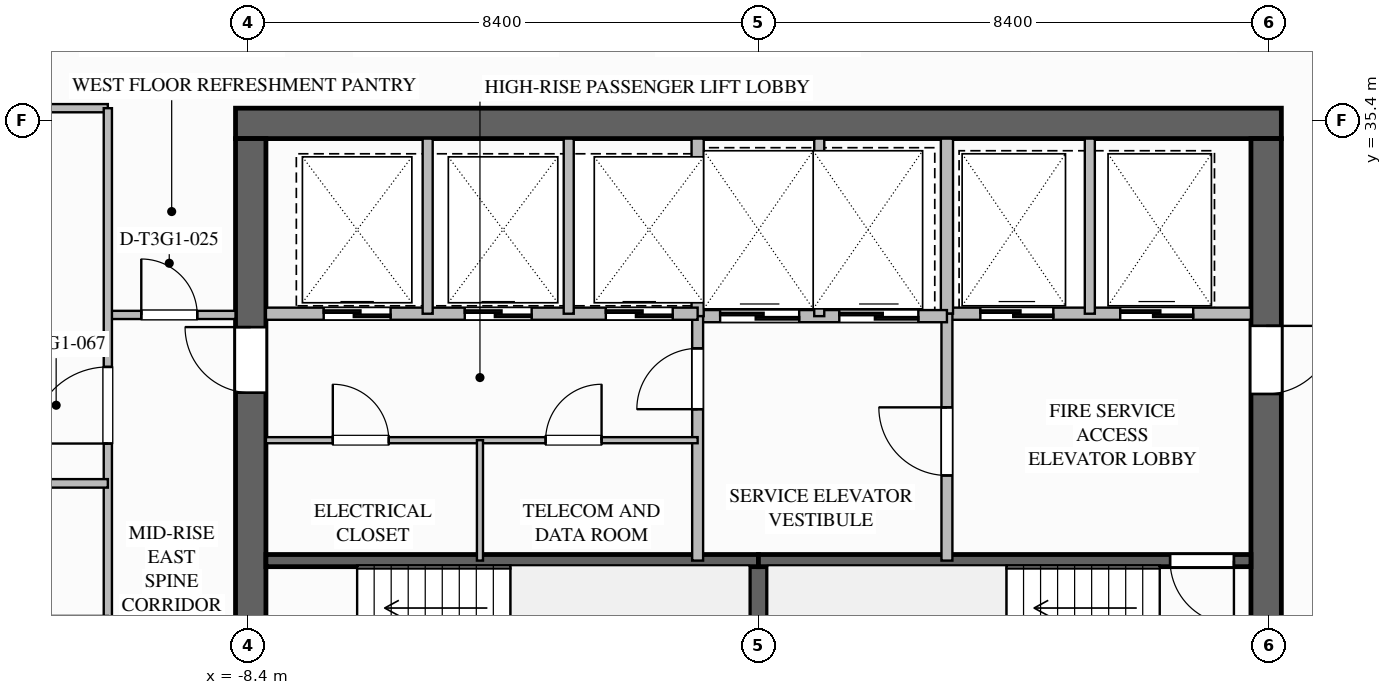
"""IFC4 building model, lengths in metres.
Left out: names, types, materials, properties, quantities, classifications, styles, units other than length and angle.
Written with IfcOpenShell. Run it as: python <this file> out.ifc"""

import sys

from ifc_helpers import new_model, si_unit, direction, frame, frame_2d, origin, place, context, subcontext, project, spatial, rectangle, extrude, element, fill, save


model = new_model("IFC4")
c1 = context("Model", 3, precision=1e-05, world=origin(), true_north=direction((0.0, 1.0)))
c2 = subcontext(c1, "Body", "Model", "MODEL_VIEW")
j1 = project(units=[si_unit("LENGTHUNIT", "METRE"), si_unit("PLANEANGLEUNIT", "RADIAN")], contexts=[c1])
p1 = place(None, origin())
s1 = spatial("IfcSite", under=j1, at=p1, CompositionType="ELEMENT")
p2 = place(p1, origin())
s2 = spatial("IfcBuilding", under=s1, at=p2, CompositionType="ELEMENT")
p3 = place(p2, frame((0.0, 0.0, 150.4)))
s3 = spatial("IfcBuildingStorey", under=s2, at=p3, CompositionType="ELEMENT", Elevation=150.4)
p4 = place(p3, frame((-8.6, 35.35, 0.0), z_axis=(0.0, 0.0, 1.0), x_axis=(1.0, 0.0, 0.0)))
e1 = element("IfcWall", 1, at=p4, inside=s3, PredefinedType="SHEAR", context=c2, shape_type="SweptSolid", body=[
    extrude(rectangle(XDim=17.2, YDim=0.5, at=frame_2d((8.6, 0.0))), origin(), (0.0, 0.0, 1.0), 3.55),
])
p5 = place(p3, frame((8.35, 35.1, 0.0), z_axis=(0.0, 0.0, 1.0), x_axis=(0.0, -1.0, 0.0)))
e2 = element("IfcWall", 2, at=p5, inside=s3, PredefinedType="SHEAR", context=c2, shape_type="SweptSolid", body=[
    extrude(rectangle(XDim=16.2, YDim=0.5, at=frame_2d((8.1, 0.0))), origin(), (0.0, 0.0, 1.0), 3.55),
])
p6 = place(p5, frame((3.08, 0.0, 0.0)))
e3 = element("IfcOpeningElement", 3, at=p6, cuts=e2, PredefinedType="OPENING", context=c2, shape_type="SweptSolid", body=[
    extrude(rectangle(XDim=1.12, YDim=2.1, at=frame_2d((0.56, 1.05))), frame((0.0, 0.26, 0.0), z_axis=(0.0, -1.0, 0.0), x_axis=(1.0, 0.0, 0.0)), (0.0, 0.0, 1.0), 0.52),
])
p7 = place(p5, frame((10.62, 0.0, 0.0)))
e4 = element("IfcOpeningElement", 4, at=p7, cuts=e2, PredefinedType="OPENING", context=c2, shape_type="SweptSolid", body=[
    extrude(rectangle(XDim=1.08, YDim=2.04, at=frame_2d((0.54, 1.02))), frame((0.0, 0.26, 0.0), z_axis=(0.0, -1.0, 0.0), x_axis=(1.0, 0.0, 0.0)), (0.0, 0.0, 1.0), 0.52),
])
p8 = place(p3, frame((-8.35, 18.9, 0.0), z_axis=(0.0, 0.0, 1.0), x_axis=(0.0, 1.0, 0.0)))
e5 = element("IfcWall", 5, at=p8, inside=s3, PredefinedType="SHEAR", context=c2, shape_type="SweptSolid", body=[
    extrude(rectangle(XDim=16.2, YDim=0.5, at=frame_2d((8.1, 0.0))), origin(), (0.0, 0.0, 1.0), 3.55),
])
p9 = place(p8, frame((12.02, 0.0, 0.0)))
e6 = element("IfcOpeningElement", 6, at=p9, cuts=e5, PredefinedType="OPENING", context=c2, shape_type="SweptSolid", body=[
    extrude(rectangle(XDim=1.08, YDim=2.04, at=frame_2d((0.54, 1.02))), frame((0.0, 0.26, 0.0), z_axis=(0.0, -1.0, 0.0), x_axis=(1.0, 0.0, 0.0)), (0.0, 0.0, 1.0), 0.52),
])
p10 = place(p8, frame((4.5, 0.0, 0.0)))
e7 = element("IfcOpeningElement", 7, at=p10, cuts=e5, PredefinedType="OPENING", context=c2, shape_type="SweptSolid", body=[
    extrude(rectangle(XDim=1.08, YDim=2.04, at=frame_2d((0.54, 1.02))), frame((0.0, 0.26, 0.0), z_axis=(0.0, -1.0, 0.0), x_axis=(1.0, 0.0, 0.0)), (0.0, 0.0, 1.0), 0.52),
])
p11 = place(p3, frame((0.0, 25.04, 0.0), z_axis=(0.0, 0.0, 1.0), x_axis=(0.0, 1.0, 0.0)))
e8 = element("IfcWall", 8, at=p11, inside=s3, PredefinedType="SOLIDWALL", context=c2, shape_type="SweptSolid", body=[
    extrude(rectangle(XDim=3.12, YDim=0.3, at=frame_2d((1.56, 0.0))), origin(), (0.0, 0.0, 1.0), 3.29),
])
p12 = place(p3, frame((-8.1, 28.16, 0.0), z_axis=(0.0, 0.0, 1.0), x_axis=(1.0, 0.0, 0.0)))
e9 = element("IfcWall", 9, at=p12, inside=s3, PredefinedType="SOLIDWALL", context=c2, shape_type="SweptSolid", body=[
    extrude(rectangle(XDim=8.1, YDim=0.2, at=frame_2d((4.05, 0.0))), origin(), (0.0, 0.0, 1.0), 3.29),
])
p13 = place(p3, frame((8.1, 28.16, 0.0), z_axis=(0.0, 0.0, 1.0), x_axis=(-1.0, 0.0, 0.0)))
e10 = element("IfcWall", 10, at=p13, inside=s3, PredefinedType="SOLIDWALL", context=c2, shape_type="SweptSolid", body=[
    extrude(rectangle(XDim=8.1, YDim=0.2, at=frame_2d((4.05, 0.0))), origin(), (0.0, 0.0, 1.0), 3.29),
])
p14 = place(p13, frame((0.28, 0.0, 0.0)))
e11 = element("IfcOpeningElement", 11, at=p14, cuts=e10, PredefinedType="OPENING", context=c2, shape_type="SweptSolid", body=[
    extrude(rectangle(XDim=1.05, YDim=2.1, at=frame_2d((0.525, 1.05))), frame((0.0, 0.11, 0.0), z_axis=(0.0, -1.0, 0.0), x_axis=(1.0, 0.0, 0.0)), (0.0, 0.0, 1.0), 0.22),
])
p15 = place(p3, frame((3.1, 32.22, 0.0), z_axis=(0.0, 0.0, 1.0), x_axis=(1.0, 0.0, 0.0)))
e12 = element("IfcWall", 12, at=p15, inside=s3, PredefinedType="SOLIDWALL", context=c2, shape_type="SweptSolid", body=[
    extrude(rectangle(XDim=5.0, YDim=0.2, at=frame_2d((2.5, 0.0))), origin(), (0.0, 0.0, 1.0), 3.29),
])
p16 = place(p15, frame((0.55, 0.0, 0.0)))
e13 = element("IfcOpeningElement", 13, at=p16, cuts=e12, PredefinedType="OPENING", context=c2, shape_type="SweptSolid", body=[
    extrude(rectangle(XDim=1.2, YDim=2.2, at=frame_2d((0.6, 1.1))), frame((0.0, 0.11, 0.0), z_axis=(0.0, -1.0, 0.0), x_axis=(1.0, 0.0, 0.0)), (0.0, 0.0, 1.0), 0.22),
])
p17 = place(p15, frame((2.85, 0.0, 0.0)))
e14 = element("IfcOpeningElement", 14, at=p17, cuts=e12, PredefinedType="OPENING", context=c2, shape_type="SweptSolid", body=[
    extrude(rectangle(XDim=1.2, YDim=2.2, at=frame_2d((0.6, 1.1))), frame((0.0, 0.11, 0.0), z_axis=(0.0, -1.0, 0.0), x_axis=(1.0, 0.0, 0.0)), (0.0, 0.0, 1.0), 0.22),
])
p18 = place(p3, frame((3.1, 32.22, 0.0), z_axis=(0.0, 0.0, 1.0), x_axis=(0.0, 1.0, 0.0)))
e15 = element("IfcWall", 15, at=p18, inside=s3, PredefinedType="SOLIDWALL", context=c2, shape_type="SweptSolid", body=[
    extrude(rectangle(XDim=2.88, YDim=0.2, at=frame_2d((1.44, 0.0))), origin(), (0.0, 0.0, 1.0), 3.29),
])
p19 = place(p3, frame((5.45, 32.22, 0.0), z_axis=(0.0, 0.0, 1.0), x_axis=(0.0, 1.0, 0.0)))
e16 = element("IfcWall", 16, at=p19, inside=s3, PredefinedType="PARTITIONING", context=c2, shape_type="SweptSolid", body=[
    extrude(rectangle(XDim=2.88, YDim=0.165, at=frame_2d((1.44, 0.0))), origin(), (0.0, 0.0, 1.0), 3.29),
])
p20 = place(p3, frame((3.1, 28.16, 0.0), z_axis=(0.0, 0.0, 1.0), x_axis=(0.0, 1.0, 0.0)))
e17 = element("IfcWall", 17, at=p20, inside=s3, PredefinedType="SOLIDWALL", context=c2, shape_type="SweptSolid", body=[
    extrude(rectangle(XDim=4.06, YDim=0.18, at=frame_2d((2.03, 0.0))), origin(), (0.0, 0.0, 1.0), 3.29),
])
p21 = place(p20, frame((1.4, 0.0, 0.0)))
e18 = element("IfcOpeningElement", 18, at=p21, cuts=e17, PredefinedType="OPENING", context=c2, shape_type="SweptSolid", body=[
    extrude(rectangle(XDim=1.12, YDim=2.1, at=frame_2d((0.56, 1.05))), frame((0.0, 0.1, 0.0), z_axis=(0.0, -1.0, 0.0), x_axis=(1.0, 0.0, 0.0)), (0.0, 0.0, 1.0), 0.2),
])
p22 = place(p3, frame((-1.0, 32.18, 0.0), z_axis=(0.0, 0.0, 1.0), x_axis=(1.0, 0.0, 0.0)))
e19 = element("IfcWall", 19, at=p22, inside=s3, PredefinedType="SOLIDWALL", context=c2, shape_type="SweptSolid", body=[
    extrude(rectangle(XDim=4.1, YDim=0.2, at=frame_2d((2.05, 0.0))), origin(), (0.0, 0.0, 1.0), 3.29),
])
p23 = place(p22, frame((0.37, 0.0, 0.0)))
e20 = element("IfcOpeningElement", 20, at=p23, cuts=e19, PredefinedType="OPENING", context=c2, shape_type="SweptSolid", body=[
    extrude(rectangle(XDim=1.3, YDim=2.2, at=frame_2d((0.65, 1.1))), frame((0.0, 0.11, 0.0), z_axis=(0.0, -1.0, 0.0), x_axis=(1.0, 0.0, 0.0)), (0.0, 0.0, 1.0), 0.22),
])
p24 = place(p22, frame((2.33, 0.0, 0.0)))
e21 = element("IfcOpeningElement", 21, at=p24, cuts=e19, PredefinedType="OPENING", context=c2, shape_type="SweptSolid", body=[
    extrude(rectangle(XDim=1.3, YDim=2.2, at=frame_2d((0.65, 1.1))), frame((0.0, 0.11, 0.0), z_axis=(0.0, -1.0, 0.0), x_axis=(1.0, 0.0, 0.0)), (0.0, 0.0, 1.0), 0.22),
])
p25 = place(p3, frame((-1.0, 32.18, 0.0), z_axis=(0.0, 0.0, 1.0), x_axis=(0.0, 1.0, 0.0)))
e22 = element("IfcWall", 22, at=p25, inside=s3, PredefinedType="SOLIDWALL", context=c2, shape_type="SweptSolid", body=[
    extrude(rectangle(XDim=2.92, YDim=0.2, at=frame_2d((1.46, 0.0))), origin(), (0.0, 0.0, 1.0), 3.29),
])
p26 = place(p3, frame((1.0, 32.18, 0.0), z_axis=(0.0, 0.0, 1.0), x_axis=(0.0, 1.0, 0.0)))
e23 = element("IfcWall", 23, at=p26, inside=s3, PredefinedType="PARTITIONING", context=c2, shape_type="SweptSolid", body=[
    extrude(rectangle(XDim=2.92, YDim=0.165, at=frame_2d((1.46, 0.0))), origin(), (0.0, 0.0, 1.0), 3.29),
])
p27 = place(p3, frame((-1.0, 28.16, 0.0), z_axis=(0.0, 0.0, 1.0), x_axis=(0.0, 1.0, 0.0)))
e24 = element("IfcWall", 24, at=p27, inside=s3, PredefinedType="SOLIDWALL", context=c2, shape_type="SweptSolid", body=[
    extrude(rectangle(XDim=4.02, YDim=0.18, at=frame_2d((2.01, 0.0))), origin(), (0.0, 0.0, 1.0), 3.29),
])
p28 = place(p27, frame((2.49, 0.0, 0.0)))
e25 = element("IfcOpeningElement", 25, at=p28, cuts=e24, PredefinedType="OPENING", context=c2, shape_type="SweptSolid", body=[
    extrude(rectangle(XDim=1.0, YDim=2.1, at=frame_2d((0.5, 1.05))), frame((0.0, 0.1, 0.0), z_axis=(0.0, -1.0, 0.0), x_axis=(1.0, 0.0, 0.0)), (0.0, 0.0, 1.0), 0.2),
])
p29 = place(p3, frame((-8.1, 32.22, 0.0), z_axis=(0.0, 0.0, 1.0), x_axis=(1.0, 0.0, 0.0)))
e26 = element("IfcWall", 26, at=p29, inside=s3, PredefinedType="SOLIDWALL", context=c2, shape_type="SweptSolid", body=[
    extrude(rectangle(XDim=7.1, YDim=0.2, at=frame_2d((3.55, 0.0))), origin(), (0.0, 0.0, 1.0), 3.29),
])
p30 = place(p29, frame((0.95, 0.0, 0.0)))
e27 = element("IfcOpeningElement", 27, at=p30, cuts=e26, PredefinedType="OPENING", context=c2, shape_type="SweptSolid", body=[
    extrude(rectangle(XDim=1.1, YDim=2.2, at=frame_2d((0.55, 1.1))), frame((0.0, 0.11, 0.0), z_axis=(0.0, -1.0, 0.0), x_axis=(1.0, 0.0, 0.0)), (0.0, 0.0, 1.0), 0.22),
])
p31 = place(p29, frame((3.27, 0.0, 0.0)))
e28 = element("IfcOpeningElement", 28, at=p31, cuts=e26, PredefinedType="OPENING", context=c2, shape_type="SweptSolid", body=[
    extrude(rectangle(XDim=1.1, YDim=2.2, at=frame_2d((0.55, 1.1))), frame((0.0, 0.11, 0.0), z_axis=(0.0, -1.0, 0.0), x_axis=(1.0, 0.0, 0.0)), (0.0, 0.0, 1.0), 0.22),
])
p32 = place(p29, frame((5.59, 0.0, 0.0)))
e29 = element("IfcOpeningElement", 29, at=p32, cuts=e26, PredefinedType="OPENING", context=c2, shape_type="SweptSolid", body=[
    extrude(rectangle(XDim=1.1, YDim=2.2, at=frame_2d((0.55, 1.1))), frame((0.0, 0.11, 0.0), z_axis=(0.0, -1.0, 0.0), x_axis=(1.0, 0.0, 0.0)), (0.0, 0.0, 1.0), 0.22),
])
for number, where, z_axis, x_axis in (
    (30, (-5.44, 32.22, 0.0), (0.0, 0.0, 1.0), (0.0, 1.0, 0.0)),
    (31, (-3.12, 32.22, 0.0), (0.0, 0.0, 1.0), (0.0, 1.0, 0.0)),
):
    element("IfcWall", number, at=place(p3, frame(where, z_axis=z_axis, x_axis=x_axis)), inside=s3, PredefinedType="PARTITIONING", context=c2, shape_type="SweptSolid", body=[
        extrude(rectangle(XDim=2.88, YDim=0.165, at=frame_2d((1.44, 0.0))), origin(), (0.0, 0.0, 1.0), 3.29),
    ])
p33 = place(p3, frame((-8.1, 30.14, 0.0), z_axis=(0.0, 0.0, 1.0), x_axis=(1.0, 0.0, 0.0)))
e32 = element("IfcWall", 32, at=p33, inside=s3, PredefinedType="PARTITIONING", context=c2, shape_type="SweptSolid", body=[
    extrude(rectangle(XDim=7.1, YDim=0.1, at=frame_2d((3.55, 0.0))), origin(), (0.0, 0.0, 1.0), 3.29),
])
p34 = place(p33, frame((1.1, 0.0, 0.0)))
e33 = element("IfcOpeningElement", 33, at=p34, cuts=e32, PredefinedType="OPENING", context=c2, shape_type="SweptSolid", body=[
    extrude(rectangle(XDim=0.92, YDim=2.1, at=frame_2d((0.46, 1.05))), frame((0.0, 0.06, 0.0), z_axis=(0.0, -1.0, 0.0), x_axis=(1.0, 0.0, 0.0)), (0.0, 0.0, 1.0), 0.12),
])
p35 = place(p33, frame((4.6, 0.0, 0.0)))
e34 = element("IfcOpeningElement", 34, at=p35, cuts=e32, PredefinedType="OPENING", context=c2, shape_type="SweptSolid", body=[
    extrude(rectangle(XDim=0.92, YDim=2.1, at=frame_2d((0.46, 1.05))), frame((0.0, 0.06, 0.0), z_axis=(0.0, -1.0, 0.0), x_axis=(1.0, 0.0, 0.0)), (0.0, 0.0, 1.0), 0.12),
])
p36 = place(p3, frame((-4.58, 28.16, 0.0), z_axis=(0.0, 0.0, 1.0), x_axis=(0.0, 1.0, 0.0)))
e35 = element("IfcWall", 35, at=p36, inside=s3, PredefinedType="PARTITIONING", context=c2, shape_type="SweptSolid", body=[
    extrude(rectangle(XDim=1.98, YDim=0.1, at=frame_2d((0.99, 0.0))), origin(), (0.0, 0.0, 1.0), 3.29),
])
p37 = place(p3, frame((-10.7, 32.2, 0.0), z_axis=(0.0, 0.0, 1.0), x_axis=(1.0, 0.0, 0.0)))
e36 = element("IfcWall", 36, at=p37, inside=s3, PredefinedType="PARTITIONING", context=c2, shape_type="SweptSolid", body=[
    extrude(rectangle(XDim=2.1, YDim=0.135, at=frame_2d((1.05, 0.0))), origin(), (0.0, 0.0, 1.0), 3.29),
])
p38 = place(p37, frame((0.55, 0.0, 0.0)))
e37 = element("IfcOpeningElement", 37, at=p38, cuts=e36, PredefinedType="OPENING", context=c2, shape_type="SweptSolid", body=[
    extrude(rectangle(XDim=0.92, YDim=2.1, at=frame_2d((0.46, 1.05))), frame((0.0, 0.077, 0.0), z_axis=(0.0, -1.0, 0.0), x_axis=(1.0, 0.0, 0.0)), (0.0, 0.0, 1.0), 0.155),
])
p39 = place(p3, frame((-16.2, 35.6, 0.0), z_axis=(0.0, 0.0, 1.0), x_axis=(1.0, 0.0, 0.0)))
e38 = element("IfcWall", 38, at=p39, inside=s3, PredefinedType="PARTITIONING", context=c2, shape_type="SweptSolid", body=[
    extrude(rectangle(XDim=5.5, YDim=0.135, at=frame_2d((2.75, 0.0))), origin(), (0.0, 0.0, 1.0), 2.667),
])
p40 = place(p3, frame((-10.7, 18.4, 0.0), z_axis=(0.0, 0.0, 1.0), x_axis=(0.0, 1.0, 0.0)))
e39 = element("IfcWall", 39, at=p40, inside=s3, PredefinedType="PARTITIONING", context=c2, shape_type="SweptSolid", body=[
    extrude(rectangle(XDim=17.2, YDim=0.135, at=frame_2d((8.6, 0.0))), origin(), (0.0, 0.0, 1.0), 3.29),
])
p41 = place(p40, frame((6.685, 0.0, 0.0)))
e40 = element("IfcOpeningElement", 40, at=p41, cuts=e39, PredefinedType="OPENING", context=c2, shape_type="SweptSolid", body=[
    extrude(rectangle(XDim=1.26, YDim=2.2, at=frame_2d((0.63, 1.1))), frame((0.0, 0.077, 0.0), z_axis=(0.0, -1.0, 0.0), x_axis=(1.0, 0.0, 0.0)), (0.0, 0.0, 1.0), 0.155),
])
p42 = place(p40, frame((11.685, 0.0, 0.0)))
e41 = element("IfcOpeningElement", 41, at=p42, cuts=e39, PredefinedType="OPENING", context=c2, shape_type="SweptSolid", body=[
    extrude(rectangle(XDim=1.26, YDim=2.2, at=frame_2d((0.63, 1.1))), frame((0.0, 0.077, 0.0), z_axis=(0.0, -1.0, 0.0), x_axis=(1.0, 0.0, 0.0)), (0.0, 0.0, 1.0), 0.155),
])
p43 = place(p3, frame((-10.7, 29.43, 0.0), z_axis=(0.0, 0.0, 1.0), x_axis=(-1.0, 0.0, 0.0)))
e42 = element("IfcWall", 42, at=p43, inside=s3, PredefinedType="PLUMBINGWALL", context=c2, shape_type="SweptSolid", body=[
    extrude(rectangle(XDim=2.15, YDim=0.14, at=frame_2d((1.075, 0.0))), origin(), (0.0, 0.0, 1.0), 3.29),
])
p44 = place(p14, origin())
e43 = element("IfcDoor", 43, at=p44, inside=s3, OperationType="SINGLE_SWING_LEFT", PredefinedType="DOOR", context=c2, shape_type="SweptSolid", body=[
    extrude(rectangle(XDim=1.05, YDim=2.1, at=frame_2d((0.525, 1.05))), frame((0.0, 0.025, 0.0), z_axis=(0.0, -1.0, 0.0), x_axis=(1.0, 0.0, 0.0)), (0.0, 0.0, 1.0), 0.05),
])
fill(e11, e43)
p45 = place(p16, origin())
e44 = element("IfcDoor", 44, at=p45, inside=s3, OperationType="SLIDING_TO_LEFT", PredefinedType="DOOR", context=c2, shape_type="SweptSolid", body=[
    extrude(rectangle(XDim=1.2, YDim=2.2, at=frame_2d((0.6, 1.1))), frame((0.0, 0.025, 0.0), z_axis=(0.0, -1.0, 0.0), x_axis=(1.0, 0.0, 0.0)), (0.0, 0.0, 1.0), 0.05),
])
fill(e13, e44)
p46 = place(p17, origin())
e45 = element("IfcDoor", 45, at=p46, inside=s3, OperationType="SLIDING_TO_LEFT", PredefinedType="DOOR", context=c2, shape_type="SweptSolid", body=[
    extrude(rectangle(XDim=1.2, YDim=2.2, at=frame_2d((0.6, 1.1))), frame((0.0, 0.025, 0.0), z_axis=(0.0, -1.0, 0.0), x_axis=(1.0, 0.0, 0.0)), (0.0, 0.0, 1.0), 0.05),
])
fill(e14, e45)
p47 = place(p21, origin())
e46 = element("IfcDoor", 46, at=p47, inside=s3, OperationType="SINGLE_SWING_RIGHT", PredefinedType="DOOR", context=c2, shape_type="SweptSolid", body=[
    extrude(rectangle(XDim=1.12, YDim=2.1, at=frame_2d((0.56, 1.05))), frame((0.0, 0.025, 0.0), z_axis=(0.0, -1.0, 0.0), x_axis=(1.0, 0.0, 0.0)), (0.0, 0.0, 1.0), 0.05),
])
fill(e18, e46)
p48 = place(p6, origin())
e47 = element("IfcDoor", 47, at=p48, inside=s3, OperationType="SINGLE_SWING_LEFT", PredefinedType="DOOR", context=c2, shape_type="SweptSolid", body=[
    extrude(rectangle(XDim=1.12, YDim=2.1, at=frame_2d((0.56, 1.05))), frame((0.0, 0.025, 0.0), z_axis=(0.0, -1.0, 0.0), x_axis=(1.0, 0.0, 0.0)), (0.0, 0.0, 1.0), 0.05),
])
fill(e3, e47)
p49 = place(p23, origin())
e48 = element("IfcDoor", 48, at=p49, inside=s3, OperationType="SLIDING_TO_LEFT", PredefinedType="DOOR", context=c2, shape_type="SweptSolid", body=[
    extrude(rectangle(XDim=1.3, YDim=2.2, at=frame_2d((0.65, 1.1))), frame((0.0, 0.025, 0.0), z_axis=(0.0, -1.0, 0.0), x_axis=(1.0, 0.0, 0.0)), (0.0, 0.0, 1.0), 0.05),
])
fill(e20, e48)
p50 = place(p24, origin())
e49 = element("IfcDoor", 49, at=p50, inside=s3, OperationType="SLIDING_TO_LEFT", PredefinedType="DOOR", context=c2, shape_type="SweptSolid", body=[
    extrude(rectangle(XDim=1.3, YDim=2.2, at=frame_2d((0.65, 1.1))), frame((0.0, 0.025, 0.0), z_axis=(0.0, -1.0, 0.0), x_axis=(1.0, 0.0, 0.0)), (0.0, 0.0, 1.0), 0.05),
])
fill(e21, e49)
p51 = place(p28, origin())
e50 = element("IfcDoor", 50, at=p51, inside=s3, OperationType="SINGLE_SWING_LEFT", PredefinedType="DOOR", context=c2, shape_type="SweptSolid", body=[
    extrude(rectangle(XDim=1.0, YDim=2.1, at=frame_2d((0.5, 1.05))), frame((0.0, 0.025, 0.0), z_axis=(0.0, -1.0, 0.0), x_axis=(1.0, 0.0, 0.0)), (0.0, 0.0, 1.0), 0.05),
])
fill(e25, e50)
p52 = place(p30, origin())
e51 = element("IfcDoor", 51, at=p52, inside=s3, OperationType="SLIDING_TO_LEFT", PredefinedType="DOOR", context=c2, shape_type="SweptSolid", body=[
    extrude(rectangle(XDim=1.1, YDim=2.2, at=frame_2d((0.55, 1.1))), frame((0.0, 0.025, 0.0), z_axis=(0.0, -1.0, 0.0), x_axis=(1.0, 0.0, 0.0)), (0.0, 0.0, 1.0), 0.05),
])
fill(e27, e51)
p53 = place(p31, origin())
e52 = element("IfcDoor", 52, at=p53, inside=s3, OperationType="SLIDING_TO_LEFT", PredefinedType="DOOR", context=c2, shape_type="SweptSolid", body=[
    extrude(rectangle(XDim=1.1, YDim=2.2, at=frame_2d((0.55, 1.1))), frame((0.0, 0.025, 0.0), z_axis=(0.0, -1.0, 0.0), x_axis=(1.0, 0.0, 0.0)), (0.0, 0.0, 1.0), 0.05),
])
fill(e28, e52)
p54 = place(p32, origin())
e53 = element("IfcDoor", 53, at=p54, inside=s3, OperationType="SLIDING_TO_LEFT", PredefinedType="DOOR", context=c2, shape_type="SweptSolid", body=[
    extrude(rectangle(XDim=1.1, YDim=2.2, at=frame_2d((0.55, 1.1))), frame((0.0, 0.025, 0.0), z_axis=(0.0, -1.0, 0.0), x_axis=(1.0, 0.0, 0.0)), (0.0, 0.0, 1.0), 0.05),
])
fill(e29, e53)
p55 = place(p9, origin())
e54 = element("IfcDoor", 54, at=p55, inside=s3, OperationType="SINGLE_SWING_RIGHT", PredefinedType="DOOR", context=c2, shape_type="SweptSolid", body=[
    extrude(rectangle(XDim=1.08, YDim=2.04, at=frame_2d((0.54, 1.02))), frame((0.0, 0.025, 0.0), z_axis=(0.0, -1.0, 0.0), x_axis=(1.0, 0.0, 0.0)), (0.0, 0.0, 1.0), 0.05),
])
fill(e6, e54)
p56 = place(p34, origin())
e55 = element("IfcDoor", 55, at=p56, inside=s3, OperationType="SINGLE_SWING_LEFT", PredefinedType="DOOR", context=c2, shape_type="SweptSolid", body=[
    extrude(rectangle(XDim=0.92, YDim=2.1, at=frame_2d((0.46, 1.05))), frame((0.0, 0.025, 0.0), z_axis=(0.0, -1.0, 0.0), x_axis=(1.0, 0.0, 0.0)), (0.0, 0.0, 1.0), 0.05),
])
fill(e33, e55)
p57 = place(p35, origin())
e56 = element("IfcDoor", 56, at=p57, inside=s3, OperationType="SINGLE_SWING_RIGHT", PredefinedType="DOOR", context=c2, shape_type="SweptSolid", body=[
    extrude(rectangle(XDim=0.92, YDim=2.1, at=frame_2d((0.46, 1.05))), frame((0.0, 0.025, 0.0), z_axis=(0.0, -1.0, 0.0), x_axis=(1.0, 0.0, 0.0)), (0.0, 0.0, 1.0), 0.05),
])
fill(e34, e56)
p58 = place(p38, origin())
e57 = element("IfcDoor", 57, at=p58, inside=s3, OperationType="SINGLE_SWING_LEFT", PredefinedType="DOOR", context=c2, shape_type="SweptSolid", body=[
    extrude(rectangle(XDim=0.92, YDim=2.1, at=frame_2d((0.46, 1.05))), frame((0.0, 0.025, 0.0), z_axis=(0.0, -1.0, 0.0), x_axis=(1.0, 0.0, 0.0)), (0.0, 0.0, 1.0), 0.05),
])
fill(e37, e57)
p59 = place(p42, origin())
e58 = element("IfcDoor", 58, at=p59, inside=s3, OperationType="SINGLE_SWING_LEFT", PredefinedType="DOOR", context=c2, shape_type="SweptSolid", body=[
    extrude(rectangle(XDim=1.26, YDim=2.2, at=frame_2d((0.63, 1.1))), frame((0.0, 0.025, 0.0), z_axis=(0.0, -1.0, 0.0), x_axis=(1.0, 0.0, 0.0)), (0.0, 0.0, 1.0), 0.05),
])
fill(e41, e58)
save(model, sys.argv[1])
